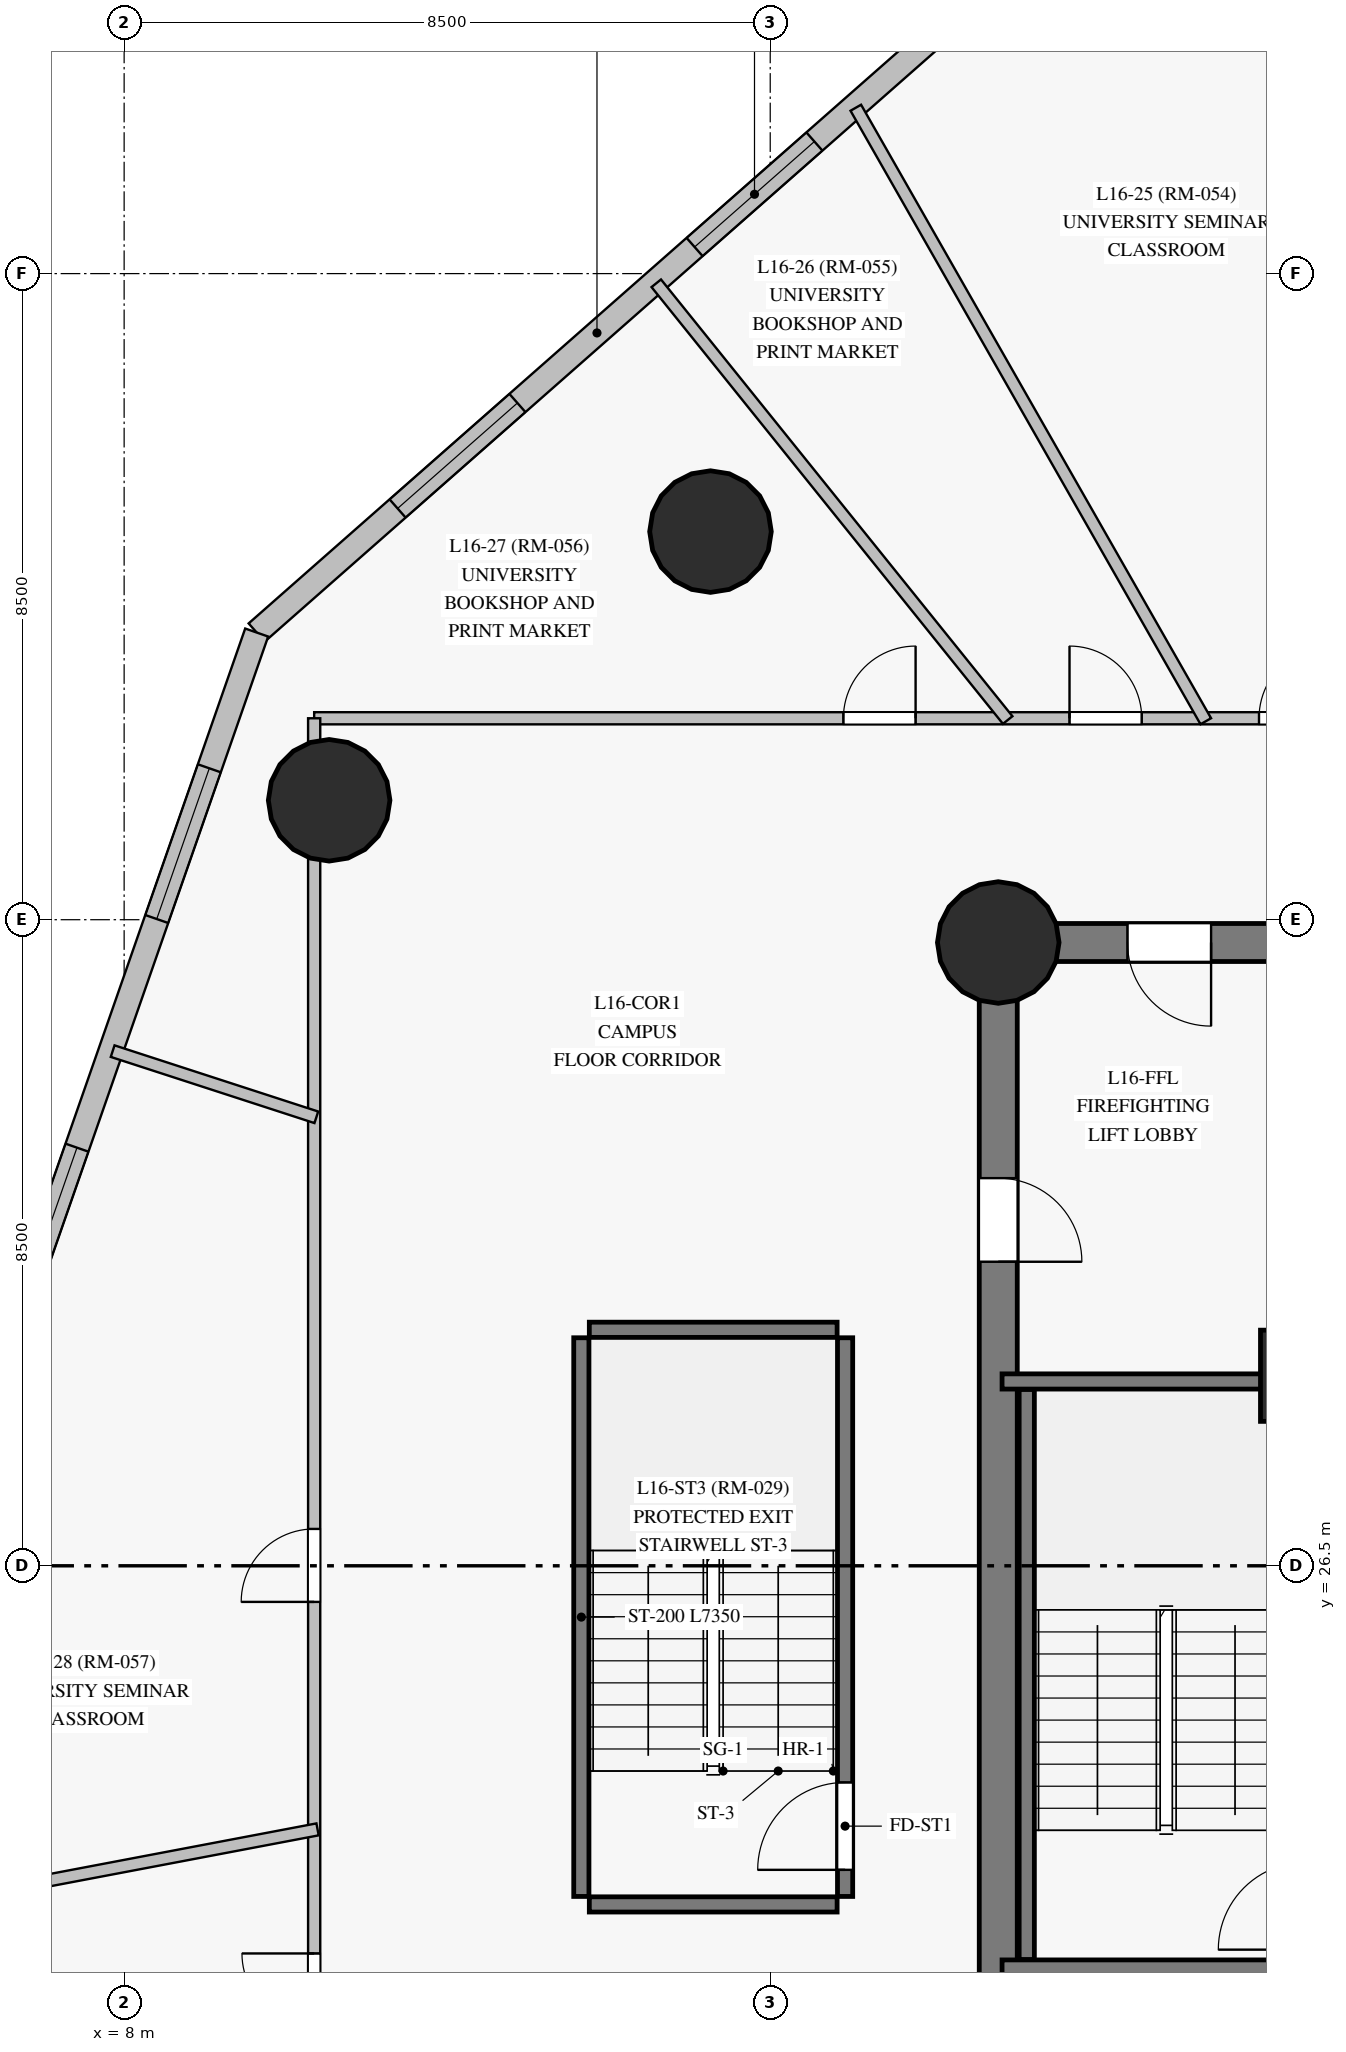
"""IFC4 building model, lengths in metres.
Left out: names, types, materials, properties, quantities, classifications, styles, units other than length and angle.
Written with IfcOpenShell. Run it as: python <this file> out.ifc"""

import sys

from ifc_helpers import new_model, si_unit, direction, frame, frame_2d, origin, origin_with_axes, origin_2d, place, context, subcontext, project, spatial, rectangle, circle, extrude, source, transform, mapped, element, fill, save


model = new_model("IFC4")
c1 = context("Model", 3, precision=1e-05, world=origin(), true_north=direction((0.0, 1.0)))
c2 = subcontext(c1, "Body", "Model", "MODEL_VIEW")
j1 = project(units=[si_unit("LENGTHUNIT", "METRE"), si_unit("PLANEANGLEUNIT", "RADIAN")], contexts=[c1])
p1 = place(None, origin())
s1 = spatial("IfcSite", under=j1, at=p1, CompositionType="ELEMENT")
p2 = place(p1, origin())
s2 = spatial("IfcBuilding", under=s1, at=p2, CompositionType="ELEMENT")
p3 = place(p2, frame((0.0, 0.0, 62.5)))
s3 = spatial("IfcBuildingStorey", under=s2, at=p3, CompositionType="ELEMENT", Elevation=62.5)
p4 = place(p3, frame((26.55, 34.7, 0.0), z_axis=(0.0, 0.0, 1.0), x_axis=(-1.0, 0.0, 0.0)))
e1 = element("IfcWall", 1, at=p4, inside=s3, PredefinedType="SHEAR", context=c2, shape_type="SweptSolid", body=[
    extrude(rectangle(XDim=7.05, YDim=0.5, at=frame_2d((3.525, 0.0))), origin(), (0.0, 0.0, 1.0), 3.35),
])
p5 = place(p4, frame((4.25, 0.0, 0.0)))
e2 = element("IfcOpeningElement", 2, at=p5, cuts=e1, PredefinedType="OPENING", context=c2, shape_type="SweptSolid", body=[
    extrude(rectangle(XDim=1.1, YDim=2.15, at=frame_2d((0.55, 1.075))), frame((0.0, 0.26, 0.0), z_axis=(0.0, -1.0, 0.0), x_axis=(1.0, 0.0, 0.0)), (0.0, 0.0, 1.0), 0.52),
])
p6 = place(p3, frame((19.5, 34.7, 0.0), z_axis=(0.0, 0.0, 1.0), x_axis=(0.0, -1.0, 0.0)))
e3 = element("IfcWall", 3, at=p6, inside=s3, PredefinedType="SHEAR", context=c2, shape_type="SweptSolid", body=[
    extrude(rectangle(XDim=16.4, YDim=0.5, at=frame_2d((8.2, 0.0))), origin(), (0.0, 0.0, 1.0), 3.35),
])
p7 = place(p6, frame((3.1, 0.0, 0.0)))
e4 = element("IfcOpeningElement", 4, at=p7, cuts=e3, PredefinedType="OPENING", context=c2, shape_type="SweptSolid", body=[
    extrude(rectangle(XDim=1.1, YDim=2.15, at=frame_2d((0.55, 1.075))), frame((0.0, 0.26, 0.0), z_axis=(0.0, -1.0, 0.0), x_axis=(1.0, 0.0, 0.0)), (0.0, 0.0, 1.0), 0.52),
])
m1 = source(origin_with_axes(), c2, "Body", "SweptSolid", [
    extrude(circle(Radius=0.8, at=origin_2d()), origin(), (0.0, 0.0, 1.0), 3.6),
])
p8 = place(p3, frame((19.5, 34.7, 0.0), z_axis=(0.0, 0.0, 1.0), x_axis=(1.0, 0.0, 0.0)))
e5 = element("IfcColumn", 5, at=p8, inside=s3, PredefinedType="COLUMN", context=c2, shape_type="MappedRepresentation", body=[
    mapped(m1, transform((0.0, 0.0, 0.0), scale=1.0)),
])
m2 = source(origin_with_axes(), c2, "Body", "SweptSolid", [
    extrude(rectangle(XDim=1.2, YDim=1.2, at=origin_2d()), origin(), (0.0, 0.0, 1.0), 3.6),
])
p9 = place(p3, frame((23.55, 29.0, 0.0), z_axis=(0.0, 0.0, 1.0), x_axis=(1.0, 0.0, 0.0)))
e6 = element("IfcColumn", 6, at=p9, inside=s3, PredefinedType="COLUMN", context=c2, shape_type="MappedRepresentation", body=[
    mapped(m2, transform((0.0, 0.0, 0.0), scale=1.0)),
])
for number, where, z_axis, x_axis in (
    (7, (15.714, 40.106, 0.0), (0.0, 0.0, 1.0), (1.0, 0.0, 0.0)),
    (8, (10.697, 36.571, 0.0), (0.0, 0.0, 1.0), (1.0, 0.0, 0.0)),
):
    element("IfcColumn", number, at=place(p3, frame(where, z_axis=z_axis, x_axis=x_axis)), inside=s3, PredefinedType="COLUMN", context=c2, shape_type="MappedRepresentation", body=[
        mapped(m1, transform((0.0, 0.0, 0.0), scale=1.0)),
    ])
p10 = place(p3, frame((18.698, 46.661, 0.0), z_axis=(0.0, 0.0, 1.0), x_axis=(-0.750570189691, -0.66079073113, 0.0)))
e9 = element("IfcWall", 9, at=p10, inside=s3, PredefinedType="SOLIDWALL", context=c2, shape_type="SweptSolid", body=[
    extrude(rectangle(XDim=11.93, YDim=0.32, at=frame_2d((5.965, 0.0))), origin(), (0.0, 0.0, 1.0), 3.35),
])
p11 = place(p10, frame((2.154, 0.0, 0.85)))
e10 = element("IfcOpeningElement", 10, at=p11, cuts=e9, PredefinedType="OPENING", context=c2, shape_type="SweptSolid", body=[
    extrude(rectangle(XDim=2.1, YDim=1.95, at=frame_2d((1.05, 0.975))), frame((0.0, 0.17, 0.0), z_axis=(0.0, -1.0, 0.0), x_axis=(1.0, 0.0, 0.0)), (0.0, 0.0, 1.0), 0.34),
])
p12 = place(p10, frame((7.36, 0.0, 0.85)))
e11 = element("IfcOpeningElement", 11, at=p12, cuts=e9, PredefinedType="OPENING", context=c2, shape_type="SweptSolid", body=[
    extrude(rectangle(XDim=2.1, YDim=1.95, at=frame_2d((1.05, 0.975))), frame((0.0, 0.17, 0.0), z_axis=(0.0, -1.0, 0.0), x_axis=(1.0, 0.0, 0.0)), (0.0, 0.0, 1.0), 0.34),
])
p13 = place(p3, frame((9.744, 38.778, 0.0), z_axis=(0.0, 0.0, 1.0), x_axis=(-0.329395999257, -0.944191863804, 0.0)))
e12 = element("IfcWall", 12, at=p13, inside=s3, PredefinedType="SOLIDWALL", context=c2, shape_type="SweptSolid", body=[
    extrude(rectangle(XDim=14.861, YDim=0.32, at=frame_2d((7.43, 0.0))), origin(), (0.0, 0.0, 1.0), 3.35),
])
p14 = place(p13, frame((1.892, 0.0, 0.85)))
e13 = element("IfcOpeningElement", 13, at=p14, cuts=e12, PredefinedType="OPENING", context=c2, shape_type="SweptSolid", body=[
    extrude(rectangle(XDim=2.1, YDim=1.95, at=frame_2d((1.05, 0.975))), frame((0.0, 0.17, 0.0), z_axis=(0.0, -1.0, 0.0), x_axis=(1.0, 0.0, 0.0)), (0.0, 0.0, 1.0), 0.34),
])
p15 = place(p13, frame((7.177, 0.0, 0.85)))
e14 = element("IfcOpeningElement", 14, at=p15, cuts=e12, PredefinedType="OPENING", context=c2, shape_type="SweptSolid", body=[
    extrude(rectangle(XDim=2.1, YDim=1.95, at=frame_2d((1.05, 0.975))), frame((0.0, 0.17, 0.0), z_axis=(0.0, -1.0, 0.0), x_axis=(1.0, 0.0, 0.0)), (0.0, 0.0, 1.0), 0.34),
])
p16 = place(p13, frame((11.346, 0.0, 0.85)))
e15 = element("IfcOpeningElement", 15, at=p16, cuts=e12, PredefinedType="OPENING", context=c2, shape_type="SweptSolid", body=[
    extrude(rectangle(XDim=2.1, YDim=1.95, at=frame_2d((1.05, 0.975))), frame((0.0, 0.17, 0.0), z_axis=(0.0, -1.0, 0.0), x_axis=(1.0, 0.0, 0.0)), (0.0, 0.0, 1.0), 0.34),
])
p17 = place(p3, frame((19.875, 21.32, 0.0), z_axis=(0.0, 0.0, 1.0), x_axis=(0.0, 1.0, 0.0)))
e16 = element("IfcWall", 16, at=p17, inside=s3, PredefinedType="SHEAR", context=c2, shape_type="SweptSolid", body=[
    extrude(rectangle(XDim=7.5, YDim=0.2, at=frame_2d((3.75, 0.0))), origin(), (0.0, 0.0, 1.0), 3.35),
])
p18 = place(p3, frame((14.015, 22.15, 0.0), z_axis=(0.0, 0.0, 1.0), x_axis=(0.0, 1.0, 0.0)))
e17 = element("IfcWall", 17, at=p18, inside=s3, PredefinedType="SHEAR", context=c2, shape_type="SweptSolid", body=[
    extrude(rectangle(XDim=7.35, YDim=0.2, at=frame_2d((3.675, 0.0))), origin(), (0.0, 0.0, 1.0), 3.35),
])
p19 = place(p3, frame((17.485, 22.15, 0.0), z_axis=(0.0, 0.0, 1.0), x_axis=(0.0, 1.0, 0.0)))
e18 = element("IfcWall", 18, at=p19, inside=s3, PredefinedType="SHEAR", context=c2, shape_type="SweptSolid", body=[
    extrude(rectangle(XDim=7.35, YDim=0.2, at=frame_2d((3.675, 0.0))), origin(), (0.0, 0.0, 1.0), 3.35),
])
p20 = place(p19, frame((0.35, 0.0, 0.0)))
e19 = element("IfcOpeningElement", 19, at=p20, cuts=e18, PredefinedType="OPENING", context=c2, shape_type="SweptSolid", body=[
    extrude(rectangle(XDim=1.15, YDim=2.15, at=frame_2d((0.575, 1.075))), frame((0.0, 0.11, 0.0), z_axis=(0.0, -1.0, 0.0), x_axis=(1.0, 0.0, 0.0)), (0.0, 0.0, 1.0), 0.22),
])
for number, where, z_axis, x_axis in (
    (20, (19.55, 21.215, 0.0), (0.0, 0.0, 1.0), (1.0, 0.0, 0.0)),
    (21, (19.55, 28.925, 0.0), (0.0, 0.0, 1.0), (1.0, 0.0, 0.0)),
):
    element("IfcWall", number, at=place(p3, frame(where, z_axis=z_axis, x_axis=x_axis)), inside=s3, PredefinedType="SHEAR", context=c2, shape_type="SweptSolid", body=[
        extrude(rectangle(XDim=3.995, YDim=0.2, at=frame_2d((1.998, 0.0))), origin(), (0.0, 0.0, 1.0), 3.35),
    ])
for number, where, z_axis, x_axis in (
    (22, (14.12, 22.045, 0.0), (0.0, 0.0, 1.0), (1.0, 0.0, 0.0)),
    (23, (14.12, 29.605, 0.0), (0.0, 0.0, 1.0), (1.0, 0.0, 0.0)),
):
    element("IfcWall", number, at=place(p3, frame(where, z_axis=z_axis, x_axis=x_axis)), inside=s3, PredefinedType="SHEAR", context=c2, shape_type="SweptSolid", body=[
        extrude(rectangle(XDim=3.26, YDim=0.2, at=frame_2d((1.63, 0.0))), origin(), (0.0, 0.0, 1.0), 3.35),
    ])
p21 = place(p3, frame((10.5, 37.65, 0.0), z_axis=(0.0, 0.0, 1.0), x_axis=(1.0, 0.0, 0.0)))
e24 = element("IfcWall", 24, at=p21, inside=s3, PredefinedType="PARTITIONING", context=c2, shape_type="SweptSolid", body=[
    extrude(rectangle(XDim=29.75, YDim=0.16, at=frame_2d((14.875, 0.0))), origin(), (0.0, 0.0, 1.0), 2.75),
])
p22 = place(p21, frame((27.99, 0.0, 0.0)))
e25 = element("IfcOpeningElement", 25, at=p22, cuts=e24, PredefinedType="OPENING", context=c2, shape_type="SweptSolid", body=[
    extrude(rectangle(XDim=0.96, YDim=2.15, at=frame_2d((0.48, 1.075))), frame((0.0, 0.09, 0.0), z_axis=(0.0, -1.0, 0.0), x_axis=(1.0, 0.0, 0.0)), (0.0, 0.0, 1.0), 0.18),
])
p23 = place(p21, frame((25.342, 0.0, 0.0)))
e26 = element("IfcOpeningElement", 26, at=p23, cuts=e24, PredefinedType="OPENING", context=c2, shape_type="SweptSolid", body=[
    extrude(rectangle(XDim=0.95, YDim=2.15, at=frame_2d((0.475, 1.075))), frame((0.0, 0.09, 0.0), z_axis=(0.0, -1.0, 0.0), x_axis=(1.0, 0.0, 0.0)), (0.0, 0.0, 1.0), 0.18),
])
p24 = place(p21, frame((22.028, 0.0, 0.0)))
e27 = element("IfcOpeningElement", 27, at=p24, cuts=e24, PredefinedType="OPENING", context=c2, shape_type="SweptSolid", body=[
    extrude(rectangle(XDim=0.95, YDim=2.15, at=frame_2d((0.475, 1.075))), frame((0.0, 0.09, 0.0), z_axis=(0.0, -1.0, 0.0), x_axis=(1.0, 0.0, 0.0)), (0.0, 0.0, 1.0), 0.18),
])
p25 = place(p21, frame((20.31, 0.0, 0.0)))
e28 = element("IfcOpeningElement", 28, at=p25, cuts=e24, PredefinedType="OPENING", context=c2, shape_type="SweptSolid", body=[
    extrude(rectangle(XDim=0.96, YDim=2.15, at=frame_2d((0.48, 1.075))), frame((0.0, 0.09, 0.0), z_axis=(0.0, -1.0, 0.0), x_axis=(1.0, 0.0, 0.0)), (0.0, 0.0, 1.0), 0.18),
])
p26 = place(p21, frame((14.54, 0.0, 0.0)))
e29 = element("IfcOpeningElement", 29, at=p26, cuts=e24, PredefinedType="OPENING", context=c2, shape_type="SweptSolid", body=[
    extrude(rectangle(XDim=0.95, YDim=2.15, at=frame_2d((0.475, 1.075))), frame((0.0, 0.09, 0.0), z_axis=(0.0, -1.0, 0.0), x_axis=(1.0, 0.0, 0.0)), (0.0, 0.0, 1.0), 0.18),
])
p27 = place(p21, frame((12.43, 0.0, 0.0)))
e30 = element("IfcOpeningElement", 30, at=p27, cuts=e24, PredefinedType="OPENING", context=c2, shape_type="SweptSolid", body=[
    extrude(rectangle(XDim=0.96, YDim=2.15, at=frame_2d((0.48, 1.075))), frame((0.0, 0.09, 0.0), z_axis=(0.0, -1.0, 0.0), x_axis=(1.0, 0.0, 0.0)), (0.0, 0.0, 1.0), 0.18),
])
p28 = place(p21, frame((9.938, 0.0, 0.0)))
e31 = element("IfcOpeningElement", 31, at=p28, cuts=e24, PredefinedType="OPENING", context=c2, shape_type="SweptSolid", body=[
    extrude(rectangle(XDim=0.95, YDim=2.15, at=frame_2d((0.475, 1.075))), frame((0.0, 0.09, 0.0), z_axis=(0.0, -1.0, 0.0), x_axis=(1.0, 0.0, 0.0)), (0.0, 0.0, 1.0), 0.18),
])
p29 = place(p21, frame((6.962, 0.0, 0.0)))
e32 = element("IfcOpeningElement", 32, at=p29, cuts=e24, PredefinedType="OPENING", context=c2, shape_type="SweptSolid", body=[
    extrude(rectangle(XDim=0.95, YDim=2.15, at=frame_2d((0.475, 1.075))), frame((0.0, 0.09, 0.0), z_axis=(0.0, -1.0, 0.0), x_axis=(1.0, 0.0, 0.0)), (0.0, 0.0, 1.0), 0.18),
])
p30 = place(p3, frame((10.5, 15.35, 0.0), z_axis=(0.0, 0.0, 1.0), x_axis=(0.0, 1.0, 0.0)))
e33 = element("IfcWall", 33, at=p30, inside=s3, PredefinedType="PARTITIONING", context=c2, shape_type="SweptSolid", body=[
    extrude(rectangle(XDim=22.3, YDim=0.16, at=frame_2d((11.15, 0.0))), origin(), (0.0, 0.0, 1.0), 2.75),
])
p31 = place(p30, frame((5.1, 0.0, 0.0)))
e34 = element("IfcOpeningElement", 34, at=p31, cuts=e33, PredefinedType="OPENING", context=c2, shape_type="SweptSolid", body=[
    extrude(rectangle(XDim=0.95, YDim=2.15, at=frame_2d((0.475, 1.075))), frame((0.0, 0.09, 0.0), z_axis=(0.0, -1.0, 0.0), x_axis=(1.0, 0.0, 0.0)), (0.0, 0.0, 1.0), 0.18),
])
p32 = place(p30, frame((10.675, 0.0, 0.0)))
e35 = element("IfcOpeningElement", 35, at=p32, cuts=e33, PredefinedType="OPENING", context=c2, shape_type="SweptSolid", body=[
    extrude(rectangle(XDim=0.96, YDim=2.15, at=frame_2d((0.48, 1.075))), frame((0.0, 0.09, 0.0), z_axis=(0.0, -1.0, 0.0), x_axis=(1.0, 0.0, 0.0)), (0.0, 0.0, 1.0), 0.18),
])
p33 = place(p3, frame((22.23, 37.611, 0.0), z_axis=(0.0, 0.0, 1.0), x_axis=(-0.49551633336, 0.868598620407, 0.0)))
e36 = element("IfcWall", 36, at=p33, inside=s3, PredefinedType="PARTITIONING", context=c2, shape_type="SweptSolid", body=[
    extrude(rectangle(XDim=9.292, YDim=0.16, at=frame_2d((4.646, 0.0))), origin(), (0.0, 0.0, 1.0), 3.35),
])
p34 = place(p3, frame((19.624, 37.627, 0.0), z_axis=(0.0, 0.0, 1.0), x_axis=(-0.626896706466, 0.779102380578, 0.0)))
e37 = element("IfcWall", 37, at=p34, inside=s3, PredefinedType="PARTITIONING", context=c2, shape_type="SweptSolid", body=[
    extrude(rectangle(XDim=7.375, YDim=0.16, at=frame_2d((3.688, 0.0))), origin(), (0.0, 0.0, 1.0), 3.35),
])
p35 = place(p3, frame((5.145, 22.008, 0.0), z_axis=(0.0, 0.0, 1.0), x_axis=(0.982481756529, 0.186358788598, 0.0)))
e38 = element("IfcWall", 38, at=p35, inside=s3, PredefinedType="PARTITIONING", context=c2, shape_type="SweptSolid", body=[
    extrude(rectangle(XDim=5.496, YDim=0.16, at=frame_2d((2.748, 0.0))), origin(), (0.0, 0.0, 1.0), 3.35),
])
p36 = place(p3, frame((10.529, 32.4, 0.0), z_axis=(0.0, 0.0, 1.0), x_axis=(-0.951090090214, 0.308913645373, 0.0)))
e39 = element("IfcWall", 39, at=p36, inside=s3, PredefinedType="PARTITIONING", context=c2, shape_type="SweptSolid", body=[
    extrude(rectangle(XDim=2.817, YDim=0.16, at=frame_2d((1.409, 0.0))), origin(), (0.0, 0.0, 1.0), 3.35),
])
m3 = source(origin_with_axes(), c2, "Body", "SweptSolid", [
    extrude(rectangle(XDim=2.1, YDim=1.95, at=frame_2d((1.05, 0.975))), frame((0.0, 0.03, 0.0), z_axis=(0.0, -1.0, 0.0), x_axis=(1.0, 0.0, 0.0)), (0.0, 0.0, 1.0), 0.06),
])
p37 = place(p11, origin())
e40 = element("IfcWindow", 40, at=p37, inside=s3, PartitioningType="SINGLE_PANEL", PredefinedType="WINDOW", context=c2, shape_type="MappedRepresentation", body=[
    mapped(m3, transform((0.0, 0.0, 0.0), scale=1.0)),
])
fill(e10, e40)
p38 = place(p12, origin())
e41 = element("IfcWindow", 41, at=p38, inside=s3, PartitioningType="SINGLE_PANEL", PredefinedType="WINDOW", context=c2, shape_type="MappedRepresentation", body=[
    mapped(m3, transform((0.0, 0.0, 0.0), scale=1.0)),
])
fill(e11, e41)
p39 = place(p14, origin())
e42 = element("IfcWindow", 42, at=p39, inside=s3, PartitioningType="SINGLE_PANEL", PredefinedType="WINDOW", context=c2, shape_type="MappedRepresentation", body=[
    mapped(m3, transform((0.0, 0.0, 0.0), scale=1.0)),
])
fill(e13, e42)
p40 = place(p15, origin())
e43 = element("IfcWindow", 43, at=p40, inside=s3, PartitioningType="SINGLE_PANEL", PredefinedType="WINDOW", context=c2, shape_type="MappedRepresentation", body=[
    mapped(m3, transform((0.0, 0.0, 0.0), scale=1.0)),
])
fill(e14, e43)
m4 = source(origin_with_axes(), c2, "Body", "SweptSolid", [
    extrude(rectangle(XDim=1.1, YDim=2.15, at=frame_2d((0.55, 1.075))), frame((0.0, 0.025, 0.0), z_axis=(0.0, -1.0, 0.0), x_axis=(1.0, 0.0, 0.0)), (0.0, 0.0, 1.0), 0.05),
])
p41 = place(p5, origin())
e44 = element("IfcDoor", 44, at=p41, inside=s3, OperationType="SINGLE_SWING_LEFT", PredefinedType="DOOR", context=c2, shape_type="MappedRepresentation", body=[
    mapped(m4, transform((0.0, 0.0, 0.0), scale=1.0)),
])
fill(e2, e44)
p42 = place(p7, origin())
e45 = element("IfcDoor", 45, at=p42, inside=s3, OperationType="SINGLE_SWING_RIGHT", PredefinedType="DOOR", context=c2, shape_type="MappedRepresentation", body=[
    mapped(m4, transform((0.0, 0.0, 0.0), scale=1.0)),
])
fill(e4, e45)
m5 = source(origin_with_axes(), c2, "Body", "SweptSolid", [
    extrude(rectangle(XDim=1.15, YDim=2.15, at=frame_2d((0.575, 1.075))), frame((0.0, 0.025, 0.0), z_axis=(0.0, -1.0, 0.0), x_axis=(1.0, 0.0, 0.0)), (0.0, 0.0, 1.0), 0.05),
])
p43 = place(p20, origin())
e46 = element("IfcDoor", 46, at=p43, inside=s3, OperationType="SINGLE_SWING_LEFT", PredefinedType="DOOR", context=c2, shape_type="MappedRepresentation", body=[
    mapped(m5, transform((0.0, 0.0, 0.0), scale=1.0)),
])
fill(e19, e46)
m6 = source(origin_with_axes(), c2, "Body", "SweptSolid", [
    extrude(rectangle(XDim=0.95, YDim=2.15, at=frame_2d((0.475, 1.075))), frame((0.0, 0.025, 0.0), z_axis=(0.0, -1.0, 0.0), x_axis=(1.0, 0.0, 0.0)), (0.0, 0.0, 1.0), 0.05),
])
p44 = place(p31, origin())
e47 = element("IfcDoor", 47, at=p44, inside=s3, OperationType="SINGLE_SWING_RIGHT", PredefinedType="DOOR", context=c2, shape_type="MappedRepresentation", body=[
    mapped(m6, transform((0.0, 0.0, 0.0), scale=1.0)),
])
fill(e34, e47)
m7 = source(origin_with_axes(), c2, "Body", "SweptSolid", [
    extrude(rectangle(XDim=0.96, YDim=2.15, at=frame_2d((0.48, 1.075))), frame((0.0, 0.025, 0.0), z_axis=(0.0, -1.0, 0.0), x_axis=(1.0, 0.0, 0.0)), (0.0, 0.0, 1.0), 0.05),
])
p45 = place(p27, origin())
e48 = element("IfcDoor", 48, at=p45, inside=s3, OperationType="SINGLE_SWING_RIGHT", PredefinedType="DOOR", context=c2, shape_type="MappedRepresentation", body=[
    mapped(m7, transform((0.0, 0.0, 0.0), scale=1.0)),
])
fill(e30, e48)
p46 = place(p28, origin())
e49 = element("IfcDoor", 49, at=p46, inside=s3, OperationType="SINGLE_SWING_LEFT", PredefinedType="DOOR", context=c2, shape_type="MappedRepresentation", body=[
    mapped(m6, transform((0.0, 0.0, 0.0), scale=1.0)),
])
fill(e31, e49)
p47 = place(p29, origin())
e50 = element("IfcDoor", 50, at=p47, inside=s3, OperationType="SINGLE_SWING_RIGHT", PredefinedType="DOOR", context=c2, shape_type="MappedRepresentation", body=[
    mapped(m6, transform((0.0, 0.0, 0.0), scale=1.0)),
])
fill(e32, e50)
p48 = place(p32, origin())
e51 = element("IfcDoor", 51, at=p48, inside=s3, OperationType="SINGLE_SWING_LEFT", PredefinedType="DOOR", context=c2, shape_type="MappedRepresentation", body=[
    mapped(m7, transform((0.0, 0.0, 0.0), scale=1.0)),
])
fill(e35, e51)
save(model, sys.argv[1])
